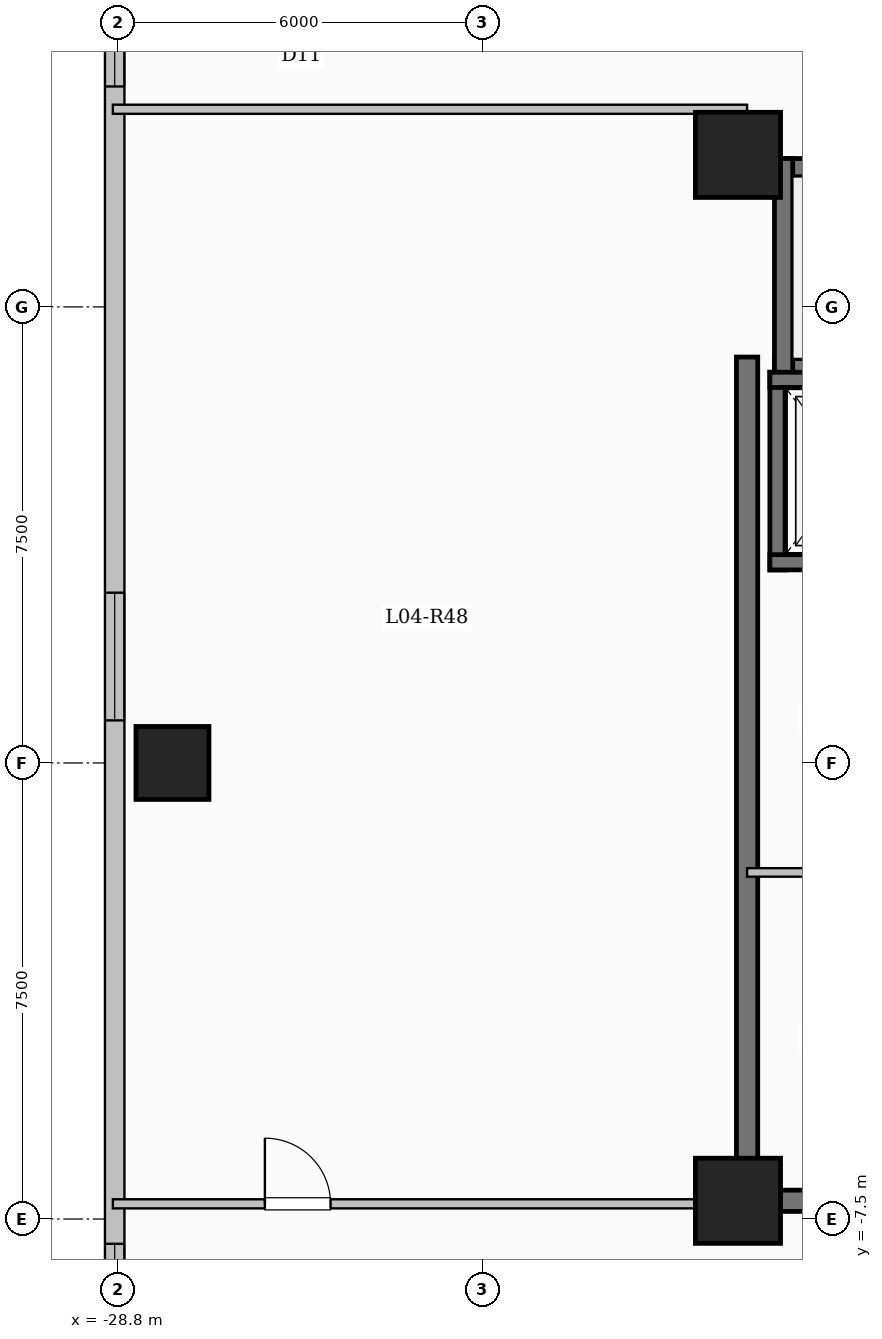
"""IFC4 building model, lengths in metres.
Left out: names, types, materials, properties, quantities, classifications, styles, units other than length and angle.
Written with IfcOpenShell. Run it as: python <this file> out.ifc"""

import sys

from ifc_helpers import new_model, si_unit, direction, frame, frame_2d, origin, origin_2d, place, context, subcontext, project, spatial, rectangle, extrude, element, fill, save


model = new_model("IFC4")
c1 = context("Model", 3, precision=1e-05, world=origin(), true_north=direction((0.0, 1.0)))
c2 = subcontext(c1, "Body", "Model", "MODEL_VIEW")
j1 = project(units=[si_unit("LENGTHUNIT", "METRE"), si_unit("PLANEANGLEUNIT", "RADIAN")], contexts=[c1])
p1 = place(None, origin())
s1 = spatial("IfcSite", under=j1, at=p1, CompositionType="ELEMENT")
p2 = place(p1, origin())
s2 = spatial("IfcBuilding", under=s1, at=p2, CompositionType="ELEMENT")
p3 = place(p2, frame((0.0, 0.0, 18.9)))
s3 = spatial("IfcBuildingStorey", under=s2, at=p3, CompositionType="ELEMENT", Elevation=18.9)
for number, where, z_axis, x_axis in (
    (1, (-18.6, -7.2, 0.0), (0.0, 0.0, 1.0), (1.0, 0.0, 0.0)),
    (2, (-18.6, 10.0, 0.0), (0.0, 0.0, 1.0), (1.0, 0.0, 0.0)),
):
    element("IfcColumn", number, at=place(p3, frame(where, z_axis=z_axis, x_axis=x_axis)), inside=s3, PredefinedType="COLUMN", context=c2, shape_type="SweptSolid", body=[
        extrude(rectangle(XDim=1.4, YDim=1.4, at=origin_2d()), origin(), (0.0, 0.0, 1.0), 5.1),
    ])
p4 = place(p3, frame((-27.9, 0.0, 0.0), z_axis=(0.0, 0.0, 1.0), x_axis=(1.0, 0.0, 0.0)))
e3 = element("IfcColumn", 3, at=p4, inside=s3, PredefinedType="COLUMN", context=c2, shape_type="SweptSolid", body=[
    extrude(rectangle(XDim=1.2, YDim=1.2, at=origin_2d()), origin(), (0.0, 0.0, 1.0), 5.1),
])
p5 = place(p3, frame((-28.85, -26.25, 0.0), z_axis=(0.0, 0.0, 1.0), x_axis=(0.0, 1.0, 0.0)))
e4 = element("IfcWall", 4, at=p5, inside=s3, PredefinedType="SOLIDWALL", context=c2, shape_type="SweptSolid", body=[
    extrude(rectangle(XDim=52.5, YDim=0.32, at=frame_2d((26.25, 0.0))), origin(), (0.0, 0.0, 1.0), 4.85),
])
p6 = place(p5, frame((6.85, 0.0, 0.9)))
e5 = element("IfcOpeningElement", 5, at=p6, cuts=e4, PredefinedType="OPENING", context=c2, shape_type="SweptSolid", body=[
    extrude(rectangle(XDim=2.1, YDim=2.0, at=frame_2d((1.05, 1.0))), frame((0.0, 0.17, 0.0), z_axis=(0.0, -1.0, 0.0), x_axis=(1.0, 0.0, 0.0)), (0.0, 0.0, 1.0), 0.34),
])
p7 = place(p5, frame((16.643, 0.0, 0.9)))
e6 = element("IfcOpeningElement", 6, at=p7, cuts=e4, PredefinedType="OPENING", context=c2, shape_type="SweptSolid", body=[
    extrude(rectangle(XDim=1.7, YDim=1.9, at=frame_2d((0.85, 0.95))), frame((0.0, 0.17, 0.0), z_axis=(0.0, -1.0, 0.0), x_axis=(1.0, 0.0, 0.0)), (0.0, 0.0, 1.0), 0.34),
])
p8 = place(p5, frame((26.95, 0.0, 0.9)))
e7 = element("IfcOpeningElement", 7, at=p8, cuts=e4, PredefinedType="OPENING", context=c2, shape_type="SweptSolid", body=[
    extrude(rectangle(XDim=2.1, YDim=2.0, at=frame_2d((1.05, 1.0))), frame((0.0, 0.17, 0.0), z_axis=(0.0, -1.0, 0.0), x_axis=(1.0, 0.0, 0.0)), (0.0, 0.0, 1.0), 0.34),
])
p9 = place(p5, frame((37.375, 0.0, 0.95)))
e8 = element("IfcOpeningElement", 8, at=p9, cuts=e4, PredefinedType="OPENING", context=c2, shape_type="SweptSolid", body=[
    extrude(rectangle(XDim=1.0, YDim=1.5, at=frame_2d((0.5, 0.75))), frame((0.0, 0.17, 0.0), z_axis=(0.0, -1.0, 0.0), x_axis=(1.0, 0.0, 0.0)), (0.0, 0.0, 1.0), 0.34),
])
p10 = place(p5, frame((44.6, 0.0, 0.9)))
e9 = element("IfcOpeningElement", 9, at=p10, cuts=e4, PredefinedType="OPENING", context=c2, shape_type="SweptSolid", body=[
    extrude(rectangle(XDim=2.1, YDim=2.0, at=frame_2d((1.05, 1.0))), frame((0.0, 0.17, 0.0), z_axis=(0.0, -1.0, 0.0), x_axis=(1.0, 0.0, 0.0)), (0.0, 0.0, 1.0), 0.34),
])
p11 = place(p3, frame((-18.0, 9.79, 0.0), z_axis=(0.0, 0.0, 1.0), x_axis=(1.0, 0.0, 0.0)))
e10 = element("IfcWall", 10, at=p11, inside=s3, PredefinedType="SHEAR", context=c2, shape_type="SweptSolid", body=[
    extrude(rectangle(XDim=8.0, YDim=0.3, at=frame_2d((4.0, 0.0))), origin(), (0.0, 0.0, 1.0), 5.1),
])
p12 = place(p3, frame((-18.0, 6.5, 0.0), z_axis=(0.0, 0.0, 1.0), x_axis=(1.0, 0.0, 0.0)))
e11 = element("IfcWall", 11, at=p12, inside=s3, PredefinedType="SHEAR", context=c2, shape_type="SweptSolid", body=[
    extrude(rectangle(XDim=8.0, YDim=0.3, at=frame_2d((4.0, 0.0))), origin(), (0.0, 0.0, 1.0), 5.1),
])
p13 = place(p12, frame((6.45, 0.0, 0.0)))
e12 = element("IfcOpeningElement", 12, at=p13, cuts=e11, PredefinedType="OPENING", context=c2, shape_type="SweptSolid", body=[
    extrude(rectangle(XDim=1.0, YDim=2.15, at=frame_2d((0.5, 1.075))), frame((0.0, 0.16, 0.0), z_axis=(0.0, -1.0, 0.0), x_axis=(1.0, 0.0, 0.0)), (0.0, 0.0, 1.0), 0.32),
])
p14 = place(p3, frame((-17.85, 6.35, 0.0), z_axis=(0.0, 0.0, 1.0), x_axis=(0.0, 1.0, 0.0)))
e13 = element("IfcWall", 13, at=p14, inside=s3, PredefinedType="SHEAR", context=c2, shape_type="SweptSolid", body=[
    extrude(rectangle(XDim=3.59, YDim=0.3, at=frame_2d((1.795, 0.0))), origin(), (0.0, 0.0, 1.0), 5.1),
])
p15 = place(p3, frame((-17.95, 3.175, 0.0), z_axis=(0.0, 0.0, 1.0), x_axis=(0.0, 1.0, 0.0)))
e14 = element("IfcWall", 14, at=p15, inside=s3, PredefinedType="SHEAR", context=c2, shape_type="SweptSolid", body=[
    extrude(rectangle(XDim=3.25, YDim=0.25, at=frame_2d((1.625, 0.0))), origin(), (0.0, 0.0, 1.0), 5.1),
])
for number, where, z_axis, x_axis in (
    (15, (-18.075, 3.3, 0.0), (0.0, 0.0, 1.0), (1.0, 0.0, 0.0)),
    (16, (-18.075, 6.3, 0.0), (0.0, 0.0, 1.0), (1.0, 0.0, 0.0)),
):
    element("IfcWall", number, at=place(p3, frame(where, z_axis=z_axis, x_axis=x_axis)), inside=s3, PredefinedType="SHEAR", context=c2, shape_type="SweptSolid", body=[
        extrude(rectangle(XDim=2.55, YDim=0.25, at=frame_2d((1.275, 0.0))), origin(), (0.0, 0.0, 1.0), 5.1),
    ])
p16 = place(p3, frame((-18.45, -7.375, 0.0), z_axis=(0.0, 0.0, 1.0), x_axis=(0.0, 1.0, 0.0)))
e17 = element("IfcWall", 17, at=p16, inside=s3, PredefinedType="SHEAR", context=c2, shape_type="SweptSolid", body=[
    extrude(rectangle(XDim=14.05, YDim=0.35, at=frame_2d((7.025, 0.0))), origin(), (0.0, 0.0, 1.0), 5.1),
])
p17 = place(p3, frame((-18.625, -7.2, 0.0), z_axis=(0.0, 0.0, 1.0), x_axis=(1.0, 0.0, 0.0)))
e18 = element("IfcWall", 18, at=p17, inside=s3, PredefinedType="SHEAR", context=c2, shape_type="SweptSolid", body=[
    extrude(rectangle(XDim=8.55, YDim=0.35, at=frame_2d((4.275, 0.0))), origin(), (0.0, 0.0, 1.0), 5.1),
])
p18 = place(p3, frame((-18.45, -1.8, 0.0), z_axis=(0.0, 0.0, 1.0), x_axis=(1.0, 0.0, 0.0)))
e19 = element("IfcWall", 19, at=p18, inside=s3, PredefinedType="PARTITIONING", context=c2, shape_type="SweptSolid", body=[
    extrude(rectangle(XDim=3.05, YDim=0.14, at=frame_2d((1.525, 0.0))), origin(), (0.0, 0.0, 1.0), 4.85),
])
p19 = place(p18, frame((1.05, 0.0, 0.0)))
e20 = element("IfcOpeningElement", 20, at=p19, cuts=e19, PredefinedType="OPENING", context=c2, shape_type="SweptSolid", body=[
    extrude(rectangle(XDim=0.9, YDim=2.08, at=frame_2d((0.45, 1.04))), frame((0.0, 0.08, 0.0), z_axis=(0.0, -1.0, 0.0), x_axis=(1.0, 0.0, 0.0)), (0.0, 0.0, 1.0), 0.16),
])
p20 = place(p3, frame((-28.88, -7.25, 0.0), z_axis=(0.0, 0.0, 1.0), x_axis=(1.0, 0.0, 0.0)))
e21 = element("IfcWall", 21, at=p20, inside=s3, PredefinedType="PARTITIONING", context=c2, shape_type="SweptSolid", body=[
    extrude(rectangle(XDim=10.43, YDim=0.15, at=frame_2d((5.215, 0.0))), origin(), (0.0, 0.0, 1.0), 4.85),
])
p21 = place(p20, frame((2.5, 0.0, 0.0)))
e22 = element("IfcOpeningElement", 22, at=p21, cuts=e21, PredefinedType="OPENING", context=c2, shape_type="SweptSolid", body=[
    extrude(rectangle(XDim=1.08, YDim=2.15, at=frame_2d((0.54, 1.075))), frame((0.0, 0.085, 0.0), z_axis=(0.0, -1.0, 0.0), x_axis=(1.0, 0.0, 0.0)), (0.0, 0.0, 1.0), 0.17),
])
p22 = place(p3, frame((-28.88, 10.75, 0.0), z_axis=(0.0, 0.0, 1.0), x_axis=(1.0, 0.0, 0.0)))
e23 = element("IfcWall", 23, at=p22, inside=s3, PredefinedType="PARTITIONING", context=c2, shape_type="SweptSolid", body=[
    extrude(rectangle(XDim=10.43, YDim=0.15, at=frame_2d((5.215, 0.0))), origin(), (0.0, 0.0, 1.0), 4.85),
])
p23 = place(p7, origin())
e24 = element("IfcWindow", 24, at=p23, inside=s3, PartitioningType="SINGLE_PANEL", PredefinedType="WINDOW", context=c2, shape_type="SweptSolid", body=[
    extrude(rectangle(XDim=1.7, YDim=1.9, at=frame_2d((0.85, 0.95))), frame((0.0, 0.03, 0.0), z_axis=(0.0, -1.0, 0.0), x_axis=(1.0, 0.0, 0.0)), (0.0, 0.0, 1.0), 0.06),
])
fill(e6, e24)
p24 = place(p8, origin())
e25 = element("IfcWindow", 25, at=p24, inside=s3, PartitioningType="SINGLE_PANEL", PredefinedType="WINDOW", context=c2, shape_type="SweptSolid", body=[
    extrude(rectangle(XDim=2.1, YDim=2.0, at=frame_2d((1.05, 1.0))), frame((0.0, 0.03, 0.0), z_axis=(0.0, -1.0, 0.0), x_axis=(1.0, 0.0, 0.0)), (0.0, 0.0, 1.0), 0.06),
])
fill(e7, e25)
p25 = place(p9, origin())
e26 = element("IfcWindow", 26, at=p25, inside=s3, PartitioningType="SINGLE_PANEL", PredefinedType="WINDOW", context=c2, shape_type="SweptSolid", body=[
    extrude(rectangle(XDim=1.0, YDim=1.5, at=frame_2d((0.5, 0.75))), frame((0.0, 0.03, 0.0), z_axis=(0.0, -1.0, 0.0), x_axis=(1.0, 0.0, 0.0)), (0.0, 0.0, 1.0), 0.06),
])
fill(e8, e26)
p26 = place(p21, origin())
e27 = element("IfcDoor", 27, at=p26, inside=s3, OperationType="SINGLE_SWING_LEFT", PredefinedType="DOOR", context=c2, shape_type="SweptSolid", body=[
    extrude(rectangle(XDim=1.08, YDim=2.15, at=frame_2d((0.54, 1.075))), frame((0.0, 0.025, 0.0), z_axis=(0.0, -1.0, 0.0), x_axis=(1.0, 0.0, 0.0)), (0.0, 0.0, 1.0), 0.05),
])
fill(e22, e27)
save(model, sys.argv[1])
